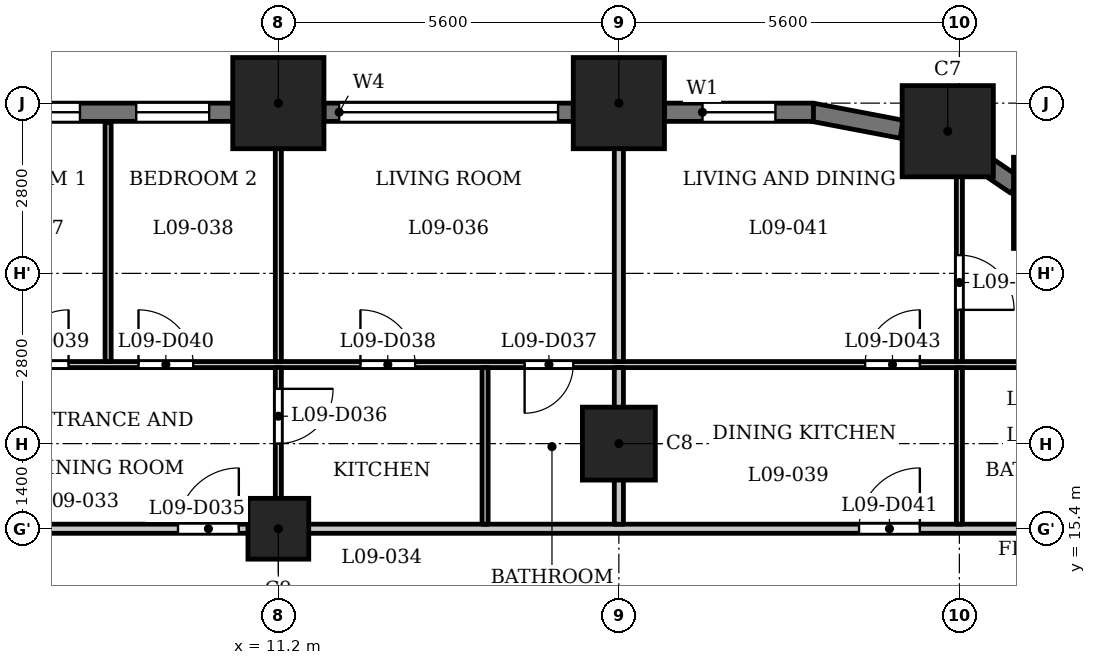
"""IFC4 building model, lengths in metres.
Left out: names, types, materials, properties, quantities, classifications, styles, units other than length and angle.
Written with IfcOpenShell. Run it as: python <this file> out.ifc"""

import sys

from ifc_helpers import new_model, si_unit, direction, frame, frame_2d, origin, origin_2d, place, context, subcontext, project, spatial, rectangle, extrude, element, fill, save


model = new_model("IFC4")
c1 = context("Model", 3, precision=1e-05, world=origin(), true_north=direction((0.0, 1.0)))
c2 = subcontext(c1, "Body", "Model", "MODEL_VIEW")
j1 = project(units=[si_unit("LENGTHUNIT", "METRE"), si_unit("PLANEANGLEUNIT", "RADIAN")], contexts=[c1])
p1 = place(None, origin())
s1 = spatial("IfcSite", under=j1, at=p1, CompositionType="ELEMENT")
p2 = place(p1, origin())
s2 = spatial("IfcBuilding", under=s1, at=p2, CompositionType="ELEMENT")
p3 = place(p2, frame((0.0, 0.0, 41.0)))
s3 = spatial("IfcBuildingStorey", under=s2, at=p3, CompositionType="ELEMENT", Elevation=41.0)
for number, where, z_axis, x_axis in (
    (1, (24.04, 20.76, 0.0), (0.0, 0.0, 1.0), (1.0, 0.0, 0.0)),
    (2, (22.209, 21.938, 0.0), (0.0, 0.0, 1.0), (1.0, 0.0, 0.0)),
    (3, (16.8, 22.4, 0.0), (0.0, 0.0, 1.0), (1.0, 0.0, 0.0)),
    (4, (11.2, 22.4, 0.0), (0.0, 0.0, 1.0), (1.0, 0.0, 0.0)),
):
    element("IfcColumn", number, at=place(p3, frame(where, z_axis=z_axis, x_axis=x_axis)), inside=s3, PredefinedType="COLUMN", context=c2, shape_type="SweptSolid", body=[
        extrude(rectangle(XDim=1.5, YDim=1.5, at=origin_2d()), origin(), (0.0, 0.0, 1.0), 3.5),
    ])
p4 = place(p3, frame((16.8, 16.8, 0.0), z_axis=(0.0, 0.0, 1.0), x_axis=(1.0, 0.0, 0.0)))
e5 = element("IfcColumn", 5, at=p4, inside=s3, PredefinedType="COLUMN", context=c2, shape_type="SweptSolid", body=[
    extrude(rectangle(XDim=1.2, YDim=1.2, at=origin_2d()), origin(), (0.0, 0.0, 1.0), 3.5),
])
p5 = place(p3, frame((11.2, 15.4, 0.0), z_axis=(0.0, 0.0, 1.0), x_axis=(1.0, 0.0, 0.0)))
e6 = element("IfcColumn", 6, at=p5, inside=s3, PredefinedType="COLUMN", context=c2, shape_type="SweptSolid", body=[
    extrude(rectangle(XDim=1.0, YDim=1.0, at=origin_2d()), origin(), (0.0, 0.0, 1.0), 3.5),
])
p6 = place(p3, frame((23.327, 21.045, 0.0), z_axis=(0.0, 0.0, 1.0), x_axis=(-0.827080706709, 0.562083182981, 0.0)))
e7 = element("IfcWall", 7, at=p6, inside=s3, PredefinedType="SOLIDWALL", context=c2, shape_type="SweptSolid", body=[
    extrude(rectangle(XDim=0.677, YDim=0.3, at=frame_2d((0.339, 0.0))), origin(), (0.0, 0.0, 1.0), 3.2),
])
p7 = place(p3, frame((21.451, 21.97, 0.0), z_axis=(0.0, 0.0, 1.0), x_axis=(-0.982287454367, 0.187380247071, 0.0)))
e8 = element("IfcWall", 8, at=p7, inside=s3, PredefinedType="SOLIDWALL", context=c2, shape_type="SweptSolid", body=[
    extrude(rectangle(XDim=1.506, YDim=0.3, at=frame_2d((0.753, 0.0))), origin(), (0.0, 0.0, 1.0), 2.35),
])
p8 = place(p3, frame((20.0, 22.25, 0.0), z_axis=(0.0, 0.0, 1.0), x_axis=(-1.0, 0.0, 0.0)))
e9 = element("IfcWall", 9, at=p8, inside=s3, PredefinedType="SOLIDWALL", context=c2, shape_type="SweptSolid", body=[
    extrude(rectangle(XDim=2.45, YDim=0.3, at=frame_2d((1.225, 0.0))), origin(), (0.0, 0.0, 1.0), 2.35),
])
p9 = place(p8, frame((0.625, 0.0, 0.6)))
e10 = element("IfcOpeningElement", 10, at=p9, cuts=e9, PredefinedType="OPENING", context=c2, shape_type="SweptSolid", body=[
    extrude(rectangle(XDim=1.2, YDim=1.55, at=frame_2d((0.6, 0.775))), frame((0.0, 0.16, 0.0), z_axis=(0.0, -1.0, 0.0), x_axis=(1.0, 0.0, 0.0)), (0.0, 0.0, 1.0), 0.32),
])
p10 = place(p3, frame((16.05, 22.25, 0.0), z_axis=(0.0, 0.0, 1.0), x_axis=(-1.0, 0.0, 0.0)))
e11 = element("IfcWall", 11, at=p10, inside=s3, PredefinedType="SOLIDWALL", context=c2, shape_type="SweptSolid", body=[
    extrude(rectangle(XDim=4.1, YDim=0.3, at=frame_2d((2.05, 0.0))), origin(), (0.0, 0.0, 1.0), 2.35),
])
p11 = place(p10, frame((0.25, 0.0, 1.2)))
e12 = element("IfcOpeningElement", 12, at=p11, cuts=e11, PredefinedType="OPENING", context=c2, shape_type="SweptSolid", body=[
    extrude(rectangle(XDim=3.6, YDim=0.95, at=frame_2d((1.8, 0.475))), frame((0.0, 0.16, 0.0), z_axis=(0.0, -1.0, 0.0), x_axis=(1.0, 0.0, 0.0)), (0.0, 0.0, 1.0), 0.32),
])
p12 = place(p3, frame((10.45, 22.25, 0.0), z_axis=(0.0, 0.0, 1.0), x_axis=(-1.0, 0.0, 0.0)))
e13 = element("IfcWall", 13, at=p12, inside=s3, PredefinedType="SOLIDWALL", context=c2, shape_type="SweptSolid", body=[
    extrude(rectangle(XDim=4.1, YDim=0.3, at=frame_2d((2.05, 0.0))), origin(), (0.0, 0.0, 1.0), 2.35),
])
p13 = place(p12, frame((0.387, 0.0, 0.6)))
e14 = element("IfcOpeningElement", 14, at=p13, cuts=e13, PredefinedType="OPENING", context=c2, shape_type="SweptSolid", body=[
    extrude(rectangle(XDim=1.2, YDim=1.55, at=frame_2d((0.6, 0.775))), frame((0.0, 0.16, 0.0), z_axis=(0.0, -1.0, 0.0), x_axis=(1.0, 0.0, 0.0)), (0.0, 0.0, 1.0), 0.32),
])
p14 = place(p12, frame((2.512, 0.0, 0.6)))
e15 = element("IfcOpeningElement", 15, at=p14, cuts=e13, PredefinedType="OPENING", context=c2, shape_type="SweptSolid", body=[
    extrude(rectangle(XDim=1.2, YDim=1.55, at=frame_2d((0.6, 0.775))), frame((0.0, 0.16, 0.0), z_axis=(0.0, -1.0, 0.0), x_axis=(1.0, 0.0, 0.0)), (0.0, 0.0, 1.0), 0.32),
])
p15 = place(p3, frame((-27.484, 15.4, 0.0), z_axis=(0.0, 0.0, 1.0), x_axis=(1.0, 0.0, 0.0)))
e16 = element("IfcWall", 16, at=p15, inside=s3, PredefinedType="PARTITIONING", context=c2, shape_type="SweptSolid", body=[
    extrude(rectangle(XDim=54.968, YDim=0.15, at=frame_2d((27.484, 0.0))), origin(), (0.0, 0.0, 1.0), 3.2),
])
p16 = place(p15, frame((8.784, 0.0, 0.0)))
e17 = element("IfcOpeningElement", 17, at=p16, cuts=e16, PredefinedType="OPENING", context=c2, shape_type="SweptSolid", body=[
    extrude(rectangle(XDim=1.0, YDim=2.1, at=frame_2d((0.5, 1.05))), frame((0.0, 0.085, 0.0), z_axis=(0.0, -1.0, 0.0), x_axis=(1.0, 0.0, 0.0)), (0.0, 0.0, 1.0), 0.17),
])
p17 = place(p15, frame((14.634, 0.0, 0.0)))
e18 = element("IfcOpeningElement", 18, at=p17, cuts=e16, PredefinedType="OPENING", context=c2, shape_type="SweptSolid", body=[
    extrude(rectangle(XDim=1.0, YDim=2.1, at=frame_2d((0.5, 1.05))), frame((0.0, 0.085, 0.0), z_axis=(0.0, -1.0, 0.0), x_axis=(1.0, 0.0, 0.0)), (0.0, 0.0, 1.0), 0.17),
])
p18 = place(p15, frame((25.834, 0.0, 0.0)))
e19 = element("IfcOpeningElement", 19, at=p18, cuts=e16, PredefinedType="OPENING", context=c2, shape_type="SweptSolid", body=[
    extrude(rectangle(XDim=1.0, YDim=2.1, at=frame_2d((0.5, 1.05))), frame((0.0, 0.085, 0.0), z_axis=(0.0, -1.0, 0.0), x_axis=(1.0, 0.0, 0.0)), (0.0, 0.0, 1.0), 0.17),
])
p19 = place(p15, frame((30.184, 0.0, 0.0)))
e20 = element("IfcOpeningElement", 20, at=p19, cuts=e16, PredefinedType="OPENING", context=c2, shape_type="SweptSolid", body=[
    extrude(rectangle(XDim=1.0, YDim=2.1, at=frame_2d((0.5, 1.05))), frame((0.0, 0.085, 0.0), z_axis=(0.0, -1.0, 0.0), x_axis=(1.0, 0.0, 0.0)), (0.0, 0.0, 1.0), 0.17),
])
p20 = place(p15, frame((37.034, 0.0, 0.0)))
e21 = element("IfcOpeningElement", 21, at=p20, cuts=e16, PredefinedType="OPENING", context=c2, shape_type="SweptSolid", body=[
    extrude(rectangle(XDim=1.0, YDim=2.1, at=frame_2d((0.5, 1.05))), frame((0.0, 0.085, 0.0), z_axis=(0.0, -1.0, 0.0), x_axis=(1.0, 0.0, 0.0)), (0.0, 0.0, 1.0), 0.17),
])
p21 = place(p15, frame((48.234, 0.0, 0.0)))
e22 = element("IfcOpeningElement", 22, at=p21, cuts=e16, PredefinedType="OPENING", context=c2, shape_type="SweptSolid", body=[
    extrude(rectangle(XDim=1.0, YDim=2.1, at=frame_2d((0.5, 1.05))), frame((0.0, 0.085, 0.0), z_axis=(0.0, -1.0, 0.0), x_axis=(1.0, 0.0, 0.0)), (0.0, 0.0, 1.0), 0.17),
])
p22 = place(p3, frame((-26.44, 18.1, 0.0), z_axis=(0.0, 0.0, 1.0), x_axis=(1.0, 0.0, 0.0)))
e23 = element("IfcWall", 23, at=p22, inside=s3, PredefinedType="PARTITIONING", context=c2, shape_type="SweptSolid", body=[
    extrude(rectangle(XDim=52.63, YDim=0.1, at=frame_2d((26.315, 0.0))), origin(), (0.0, 0.0, 1.0), 3.2),
])
p23 = place(p22, frame((2.626, 0.0, 0.0)))
e24 = element("IfcOpeningElement", 24, at=p23, cuts=e23, PredefinedType="OPENING", context=c2, shape_type="SweptSolid", body=[
    extrude(rectangle(XDim=0.8, YDim=2.1, at=frame_2d((0.4, 1.05))), frame((0.0, 0.06, 0.0), z_axis=(0.0, -1.0, 0.0), x_axis=(1.0, 0.0, 0.0)), (0.0, 0.0, 1.0), 0.12),
])
p24 = place(p22, frame((7.84, 0.0, 0.0)))
e25 = element("IfcOpeningElement", 25, at=p24, cuts=e23, PredefinedType="OPENING", context=c2, shape_type="SweptSolid", body=[
    extrude(rectangle(XDim=0.9, YDim=2.1, at=frame_2d((0.45, 1.05))), frame((0.0, 0.06, 0.0), z_axis=(0.0, -1.0, 0.0), x_axis=(1.0, 0.0, 0.0)), (0.0, 0.0, 1.0), 0.12),
])
p25 = place(p22, frame((18.49, 0.0, 0.0)))
e26 = element("IfcOpeningElement", 26, at=p25, cuts=e23, PredefinedType="OPENING", context=c2, shape_type="SweptSolid", body=[
    extrude(rectangle(XDim=0.8, YDim=2.1, at=frame_2d((0.4, 1.05))), frame((0.0, 0.06, 0.0), z_axis=(0.0, -1.0, 0.0), x_axis=(1.0, 0.0, 0.0)), (0.0, 0.0, 1.0), 0.12),
])
p26 = place(p22, frame((16.54, 0.0, 0.0)))
e27 = element("IfcOpeningElement", 27, at=p26, cuts=e23, PredefinedType="OPENING", context=c2, shape_type="SweptSolid", body=[
    extrude(rectangle(XDim=0.9, YDim=2.1, at=frame_2d((0.45, 1.05))), frame((0.0, 0.06, 0.0), z_axis=(0.0, -1.0, 0.0), x_axis=(1.0, 0.0, 0.0)), (0.0, 0.0, 1.0), 0.12),
])
p27 = place(p22, frame((10.89, 0.0, 0.0)))
e28 = element("IfcOpeningElement", 28, at=p27, cuts=e23, PredefinedType="OPENING", context=c2, shape_type="SweptSolid", body=[
    extrude(rectangle(XDim=0.9, YDim=2.1, at=frame_2d((0.45, 1.05))), frame((0.0, 0.06, 0.0), z_axis=(0.0, -1.0, 0.0), x_axis=(1.0, 0.0, 0.0)), (0.0, 0.0, 1.0), 0.12),
])
p28 = place(p22, frame((12.94, 0.0, 0.0)))
e29 = element("IfcOpeningElement", 29, at=p28, cuts=e23, PredefinedType="OPENING", context=c2, shape_type="SweptSolid", body=[
    extrude(rectangle(XDim=0.9, YDim=2.1, at=frame_2d((0.45, 1.05))), frame((0.0, 0.06, 0.0), z_axis=(0.0, -1.0, 0.0), x_axis=(1.0, 0.0, 0.0)), (0.0, 0.0, 1.0), 0.12),
])
p29 = place(p22, frame((21.49, 0.0, 0.0)))
e30 = element("IfcOpeningElement", 30, at=p29, cuts=e23, PredefinedType="OPENING", context=c2, shape_type="SweptSolid", body=[
    extrude(rectangle(XDim=0.8, YDim=2.1, at=frame_2d((0.4, 1.05))), frame((0.0, 0.06, 0.0), z_axis=(0.0, -1.0, 0.0), x_axis=(1.0, 0.0, 0.0)), (0.0, 0.0, 1.0), 0.12),
])
p30 = place(p22, frame((24.89, 0.0, 0.0)))
e31 = element("IfcOpeningElement", 31, at=p30, cuts=e23, PredefinedType="OPENING", context=c2, shape_type="SweptSolid", body=[
    extrude(rectangle(XDim=0.9, YDim=2.1, at=frame_2d((0.45, 1.05))), frame((0.0, 0.06, 0.0), z_axis=(0.0, -1.0, 0.0), x_axis=(1.0, 0.0, 0.0)), (0.0, 0.0, 1.0), 0.12),
])
p31 = place(p22, frame((27.09, 0.0, 0.0)))
e32 = element("IfcOpeningElement", 32, at=p31, cuts=e23, PredefinedType="OPENING", context=c2, shape_type="SweptSolid", body=[
    extrude(rectangle(XDim=0.8, YDim=2.1, at=frame_2d((0.4, 1.05))), frame((0.0, 0.06, 0.0), z_axis=(0.0, -1.0, 0.0), x_axis=(1.0, 0.0, 0.0)), (0.0, 0.0, 1.0), 0.12),
])
p32 = place(p22, frame((28.99, 0.0, 0.0)))
e33 = element("IfcOpeningElement", 33, at=p32, cuts=e23, PredefinedType="OPENING", context=c2, shape_type="SweptSolid", body=[
    extrude(rectangle(XDim=0.9, YDim=2.1, at=frame_2d((0.45, 1.05))), frame((0.0, 0.06, 0.0), z_axis=(0.0, -1.0, 0.0), x_axis=(1.0, 0.0, 0.0)), (0.0, 0.0, 1.0), 0.12),
])
p33 = place(p22, frame((41.69, 0.0, 0.0)))
e34 = element("IfcOpeningElement", 34, at=p33, cuts=e23, PredefinedType="OPENING", context=c2, shape_type="SweptSolid", body=[
    extrude(rectangle(XDim=0.8, YDim=2.1, at=frame_2d((0.4, 1.05))), frame((0.0, 0.06, 0.0), z_axis=(0.0, -1.0, 0.0), x_axis=(1.0, 0.0, 0.0)), (0.0, 0.0, 1.0), 0.12),
])
p34 = place(p22, frame((38.99, 0.0, 0.0)))
e35 = element("IfcOpeningElement", 35, at=p34, cuts=e23, PredefinedType="OPENING", context=c2, shape_type="SweptSolid", body=[
    extrude(rectangle(XDim=0.9, YDim=2.1, at=frame_2d((0.45, 1.05))), frame((0.0, 0.06, 0.0), z_axis=(0.0, -1.0, 0.0), x_axis=(1.0, 0.0, 0.0)), (0.0, 0.0, 1.0), 0.12),
])
p35 = place(p22, frame((33.29, 0.0, 0.0)))
e36 = element("IfcOpeningElement", 36, at=p35, cuts=e23, PredefinedType="OPENING", context=c2, shape_type="SweptSolid", body=[
    extrude(rectangle(XDim=0.9, YDim=2.1, at=frame_2d((0.45, 1.05))), frame((0.0, 0.06, 0.0), z_axis=(0.0, -1.0, 0.0), x_axis=(1.0, 0.0, 0.0)), (0.0, 0.0, 1.0), 0.12),
])
p36 = place(p22, frame((35.34, 0.0, 0.0)))
e37 = element("IfcOpeningElement", 37, at=p36, cuts=e23, PredefinedType="OPENING", context=c2, shape_type="SweptSolid", body=[
    extrude(rectangle(XDim=0.9, YDim=2.1, at=frame_2d((0.45, 1.05))), frame((0.0, 0.06, 0.0), z_axis=(0.0, -1.0, 0.0), x_axis=(1.0, 0.0, 0.0)), (0.0, 0.0, 1.0), 0.12),
])
p37 = place(p22, frame((50.74, 0.0, 0.0)))
e38 = element("IfcOpeningElement", 38, at=p37, cuts=e23, PredefinedType="OPENING", context=c2, shape_type="SweptSolid", body=[
    extrude(rectangle(XDim=0.8, YDim=2.1, at=frame_2d((0.4, 1.05))), frame((0.0, 0.06, 0.0), z_axis=(0.0, -1.0, 0.0), x_axis=(1.0, 0.0, 0.0)), (0.0, 0.0, 1.0), 0.12),
])
p38 = place(p22, frame((47.29, 0.0, 0.0)))
e39 = element("IfcOpeningElement", 39, at=p38, cuts=e23, PredefinedType="OPENING", context=c2, shape_type="SweptSolid", body=[
    extrude(rectangle(XDim=0.9, YDim=2.1, at=frame_2d((0.45, 1.05))), frame((0.0, 0.06, 0.0), z_axis=(0.0, -1.0, 0.0), x_axis=(1.0, 0.0, 0.0)), (0.0, 0.0, 1.0), 0.12),
])
p39 = place(p3, frame((8.4, 18.15, 0.0), z_axis=(0.0, 0.0, 1.0), x_axis=(0.0, 1.0, 0.0)))
e40 = element("IfcWall", 40, at=p39, inside=s3, PredefinedType="PARTITIONING", context=c2, shape_type="SweptSolid", body=[
    extrude(rectangle(XDim=3.93, YDim=0.1, at=frame_2d((1.965, 0.0))), origin(), (0.0, 0.0, 1.0), 3.2),
])
p40 = place(p3, frame((11.2, 15.475, 0.0), z_axis=(0.0, 0.0, 1.0), x_axis=(0.0, 1.0, 0.0)))
e41 = element("IfcWall", 41, at=p40, inside=s3, PredefinedType="PARTITIONING", context=c2, shape_type="SweptSolid", body=[
    extrude(rectangle(XDim=2.575, YDim=0.1, at=frame_2d((1.288, 0.0))), origin(), (0.0, 0.0, 1.0), 3.2),
])
p41 = place(p40, frame((1.326, 0.0, 0.0)))
e42 = element("IfcOpeningElement", 42, at=p41, cuts=e41, PredefinedType="OPENING", context=c2, shape_type="SweptSolid", body=[
    extrude(rectangle(XDim=0.9, YDim=2.1, at=frame_2d((0.45, 1.05))), frame((0.0, 0.06, 0.0), z_axis=(0.0, -1.0, 0.0), x_axis=(1.0, 0.0, 0.0)), (0.0, 0.0, 1.0), 0.12),
])
p42 = place(p3, frame((11.2, 18.15, 0.0), z_axis=(0.0, 0.0, 1.0), x_axis=(0.0, 1.0, 0.0)))
e43 = element("IfcWall", 43, at=p42, inside=s3, PredefinedType="PARTITIONING", context=c2, shape_type="SweptSolid", body=[
    extrude(rectangle(XDim=4.98, YDim=0.1, at=frame_2d((2.49, 0.0))), origin(), (0.0, 0.0, 1.0), 3.2),
])
p43 = place(p3, frame((14.6, 15.475, 0.0), z_axis=(0.0, 0.0, 1.0), x_axis=(0.0, 1.0, 0.0)))
e44 = element("IfcWall", 44, at=p43, inside=s3, PredefinedType="PARTITIONING", context=c2, shape_type="SweptSolid", body=[
    extrude(rectangle(XDim=2.575, YDim=0.1, at=frame_2d((1.288, 0.0))), origin(), (0.0, 0.0, 1.0), 3.2),
])
p44 = place(p3, frame((16.8, 15.475, 0.0), z_axis=(0.0, 0.0, 1.0), x_axis=(0.0, 1.0, 0.0)))
e45 = element("IfcWall", 45, at=p44, inside=s3, PredefinedType="PARTITIONING", context=c2, shape_type="SweptSolid", body=[
    extrude(rectangle(XDim=2.575, YDim=0.15, at=frame_2d((1.288, 0.0))), origin(), (0.0, 0.0, 1.0), 3.2),
])
p45 = place(p3, frame((16.8, 18.15, 0.0), z_axis=(0.0, 0.0, 1.0), x_axis=(0.0, 1.0, 0.0)))
e46 = element("IfcWall", 46, at=p45, inside=s3, PredefinedType="PARTITIONING", context=c2, shape_type="SweptSolid", body=[
    extrude(rectangle(XDim=4.98, YDim=0.15, at=frame_2d((2.49, 0.0))), origin(), (0.0, 0.0, 1.0), 3.2),
])
p46 = place(p3, frame((22.4, 15.475, 0.0), z_axis=(0.0, 0.0, 1.0), x_axis=(0.0, 1.0, 0.0)))
e47 = element("IfcWall", 47, at=p46, inside=s3, PredefinedType="PARTITIONING", context=c2, shape_type="SweptSolid", body=[
    extrude(rectangle(XDim=2.575, YDim=0.1, at=frame_2d((1.288, 0.0))), origin(), (0.0, 0.0, 1.0), 3.2),
])
p47 = place(p3, frame((22.4, 18.15, 0.0), z_axis=(0.0, 0.0, 1.0), x_axis=(0.0, 1.0, 0.0)))
e48 = element("IfcWall", 48, at=p47, inside=s3, PredefinedType="PARTITIONING", context=c2, shape_type="SweptSolid", body=[
    extrude(rectangle(XDim=3.57, YDim=0.1, at=frame_2d((1.785, 0.0))), origin(), (0.0, 0.0, 1.0), 3.2),
])
p48 = place(p47, frame((0.85, 0.0, 0.0)))
e49 = element("IfcOpeningElement", 49, at=p48, cuts=e48, PredefinedType="OPENING", context=c2, shape_type="SweptSolid", body=[
    extrude(rectangle(XDim=0.9, YDim=2.1, at=frame_2d((0.45, 1.05))), frame((0.0, 0.06, 0.0), z_axis=(0.0, -1.0, 0.0), x_axis=(1.0, 0.0, 0.0)), (0.0, 0.0, 1.0), 0.12),
])
p49 = place(p20, origin())
e50 = element("IfcDoor", 50, at=p49, inside=s3, OperationType="SINGLE_SWING_LEFT", PredefinedType="DOOR", context=c2, shape_type="SweptSolid", body=[
    extrude(rectangle(XDim=1.0, YDim=2.1, at=frame_2d((0.5, 1.05))), frame((0.0, 0.025, 0.0), z_axis=(0.0, -1.0, 0.0), x_axis=(1.0, 0.0, 0.0)), (0.0, 0.0, 1.0), 0.05),
])
fill(e21, e50)
p50 = place(p41, origin())
e51 = element("IfcDoor", 51, at=p50, inside=s3, OperationType="SINGLE_SWING_RIGHT", PredefinedType="DOOR", context=c2, shape_type="SweptSolid", body=[
    extrude(rectangle(XDim=0.9, YDim=2.1, at=frame_2d((0.45, 1.05))), frame((0.0, 0.025, 0.0), z_axis=(0.0, -1.0, 0.0), x_axis=(1.0, 0.0, 0.0)), (0.0, 0.0, 1.0), 0.05),
])
fill(e42, e51)
p51 = place(p33, origin())
e52 = element("IfcDoor", 52, at=p51, inside=s3, OperationType="SINGLE_SWING_LEFT", PredefinedType="DOOR", context=c2, shape_type="SweptSolid", body=[
    extrude(rectangle(XDim=0.8, YDim=2.1, at=frame_2d((0.4, 1.05))), frame((0.0, 0.025, 0.0), z_axis=(0.0, -1.0, 0.0), x_axis=(1.0, 0.0, 0.0)), (0.0, 0.0, 1.0), 0.05),
])
fill(e34, e52)
p52 = place(p34, origin())
e53 = element("IfcDoor", 53, at=p52, inside=s3, OperationType="SINGLE_SWING_RIGHT", PredefinedType="DOOR", context=c2, shape_type="SweptSolid", body=[
    extrude(rectangle(XDim=0.9, YDim=2.1, at=frame_2d((0.45, 1.05))), frame((0.0, 0.025, 0.0), z_axis=(0.0, -1.0, 0.0), x_axis=(1.0, 0.0, 0.0)), (0.0, 0.0, 1.0), 0.05),
])
fill(e35, e53)
p53 = place(p35, origin())
e54 = element("IfcDoor", 54, at=p53, inside=s3, OperationType="SINGLE_SWING_LEFT", PredefinedType="DOOR", context=c2, shape_type="SweptSolid", body=[
    extrude(rectangle(XDim=0.9, YDim=2.1, at=frame_2d((0.45, 1.05))), frame((0.0, 0.025, 0.0), z_axis=(0.0, -1.0, 0.0), x_axis=(1.0, 0.0, 0.0)), (0.0, 0.0, 1.0), 0.05),
])
fill(e36, e54)
p54 = place(p36, origin())
e55 = element("IfcDoor", 55, at=p54, inside=s3, OperationType="SINGLE_SWING_RIGHT", PredefinedType="DOOR", context=c2, shape_type="SweptSolid", body=[
    extrude(rectangle(XDim=0.9, YDim=2.1, at=frame_2d((0.45, 1.05))), frame((0.0, 0.025, 0.0), z_axis=(0.0, -1.0, 0.0), x_axis=(1.0, 0.0, 0.0)), (0.0, 0.0, 1.0), 0.05),
])
fill(e37, e55)
p55 = place(p21, origin())
e56 = element("IfcDoor", 56, at=p55, inside=s3, OperationType="SINGLE_SWING_LEFT", PredefinedType="DOOR", context=c2, shape_type="SweptSolid", body=[
    extrude(rectangle(XDim=1.0, YDim=2.1, at=frame_2d((0.5, 1.05))), frame((0.0, 0.025, 0.0), z_axis=(0.0, -1.0, 0.0), x_axis=(1.0, 0.0, 0.0)), (0.0, 0.0, 1.0), 0.05),
])
fill(e22, e56)
p56 = place(p38, origin())
e57 = element("IfcDoor", 57, at=p56, inside=s3, OperationType="SINGLE_SWING_LEFT", PredefinedType="DOOR", context=c2, shape_type="SweptSolid", body=[
    extrude(rectangle(XDim=0.9, YDim=2.1, at=frame_2d((0.45, 1.05))), frame((0.0, 0.025, 0.0), z_axis=(0.0, -1.0, 0.0), x_axis=(1.0, 0.0, 0.0)), (0.0, 0.0, 1.0), 0.05),
])
fill(e39, e57)
p57 = place(p48, origin())
e58 = element("IfcDoor", 58, at=p57, inside=s3, OperationType="SINGLE_SWING_LEFT", PredefinedType="DOOR", context=c2, shape_type="SweptSolid", body=[
    extrude(rectangle(XDim=0.9, YDim=2.1, at=frame_2d((0.45, 1.05))), frame((0.0, 0.025, 0.0), z_axis=(0.0, -1.0, 0.0), x_axis=(1.0, 0.0, 0.0)), (0.0, 0.0, 1.0), 0.05),
])
fill(e49, e58)
p58 = place(p9, origin())
e59 = element("IfcWindow", 59, at=p58, inside=s3, PartitioningType="SINGLE_PANEL", PredefinedType="WINDOW", context=c2, shape_type="SweptSolid", body=[
    extrude(rectangle(XDim=1.2, YDim=1.55, at=frame_2d((0.6, 0.775))), frame((0.0, 0.03, 0.0), z_axis=(0.0, -1.0, 0.0), x_axis=(1.0, 0.0, 0.0)), (0.0, 0.0, 1.0), 0.06),
])
fill(e10, e59)
p59 = place(p11, origin())
e60 = element("IfcWindow", 60, at=p59, inside=s3, PartitioningType="SINGLE_PANEL", PredefinedType="WINDOW", context=c2, shape_type="SweptSolid", body=[
    extrude(rectangle(XDim=3.6, YDim=0.95, at=frame_2d((1.8, 0.475))), frame((0.0, 0.03, 0.0), z_axis=(0.0, -1.0, 0.0), x_axis=(1.0, 0.0, 0.0)), (0.0, 0.0, 1.0), 0.06),
])
fill(e12, e60)
p60 = place(p13, origin())
e61 = element("IfcWindow", 61, at=p60, inside=s3, PartitioningType="SINGLE_PANEL", PredefinedType="WINDOW", context=c2, shape_type="SweptSolid", body=[
    extrude(rectangle(XDim=1.2, YDim=1.55, at=frame_2d((0.6, 0.775))), frame((0.0, 0.03, 0.0), z_axis=(0.0, -1.0, 0.0), x_axis=(1.0, 0.0, 0.0)), (0.0, 0.0, 1.0), 0.06),
])
fill(e14, e61)
p61 = place(p14, origin())
e62 = element("IfcWindow", 62, at=p61, inside=s3, PartitioningType="SINGLE_PANEL", PredefinedType="WINDOW", context=c2, shape_type="SweptSolid", body=[
    extrude(rectangle(XDim=1.2, YDim=1.55, at=frame_2d((0.6, 0.775))), frame((0.0, 0.03, 0.0), z_axis=(0.0, -1.0, 0.0), x_axis=(1.0, 0.0, 0.0)), (0.0, 0.0, 1.0), 0.06),
])
fill(e15, e62)
save(model, sys.argv[1])
